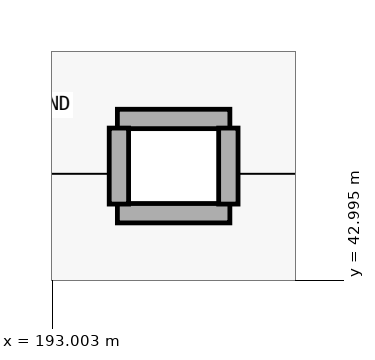
"""IFC4 building model, lengths in metres.
Left out: names, types, materials, properties, quantities, classifications, styles, units other than length and angle.
Written with IfcOpenShell. Run it as: python <this file> out.ifc"""

import sys

from ifc_helpers import new_model, si_unit, direction, frame, frame_2d, origin, place, context, subcontext, project, spatial, rectangle, extrude, element, save


model = new_model("IFC4")
c1 = context("Model", 3, precision=1e-05, world=origin(), true_north=direction((0.0, 1.0)))
c2 = subcontext(c1, "Body", "Model", "MODEL_VIEW")
j1 = project(units=[si_unit("LENGTHUNIT", "METRE"), si_unit("PLANEANGLEUNIT", "RADIAN")], contexts=[c1])
p1 = place(None, origin())
s1 = spatial("IfcSite", under=j1, at=p1, CompositionType="ELEMENT")
p2 = place(p1, origin())
s2 = spatial("IfcBuilding", under=s1, at=p2, CompositionType="ELEMENT")
p3 = place(p2, frame((0.0, 0.0, -4.8)))
s3 = spatial("IfcBuildingStorey", under=s2, at=p3, CompositionType="ELEMENT", Elevation=-4.8)
for number, where, z_axis, x_axis in (
    (1, (193.86, 45.12, 0.0), (0.0, 0.0, 1.0), (1.0, 0.0, 0.0)),
    (2, (193.86, 43.88, 0.0), (0.0, 0.0, 1.0), (1.0, 0.0, 0.0)),
):
    element("IfcWall", number, at=place(p3, frame(where, z_axis=z_axis, x_axis=x_axis)), inside=s3, PredefinedType="PARTITIONING", context=c2, shape_type="SweptSolid", body=[
        extrude(rectangle(XDim=1.48, YDim=0.255, at=frame_2d((0.74, 0.0))), origin(), (0.0, 0.0, 1.0), 4.36),
    ])
for number, where, z_axis, x_axis in (
    (3, (193.88, 44.0, 0.0), (0.0, 0.0, 1.0), (0.0, 1.0, 0.0)),
    (4, (195.32, 44.0, 0.0), (0.0, 0.0, 1.0), (0.0, 1.0, 0.0)),
):
    element("IfcWall", number, at=place(p3, frame(where, z_axis=z_axis, x_axis=x_axis)), inside=s3, PredefinedType="PARTITIONING", context=c2, shape_type="SweptSolid", body=[
        extrude(rectangle(XDim=1.0, YDim=0.255, at=frame_2d((0.5, 0.0))), origin(), (0.0, 0.0, 1.0), 4.36),
    ])
save(model, sys.argv[1])
